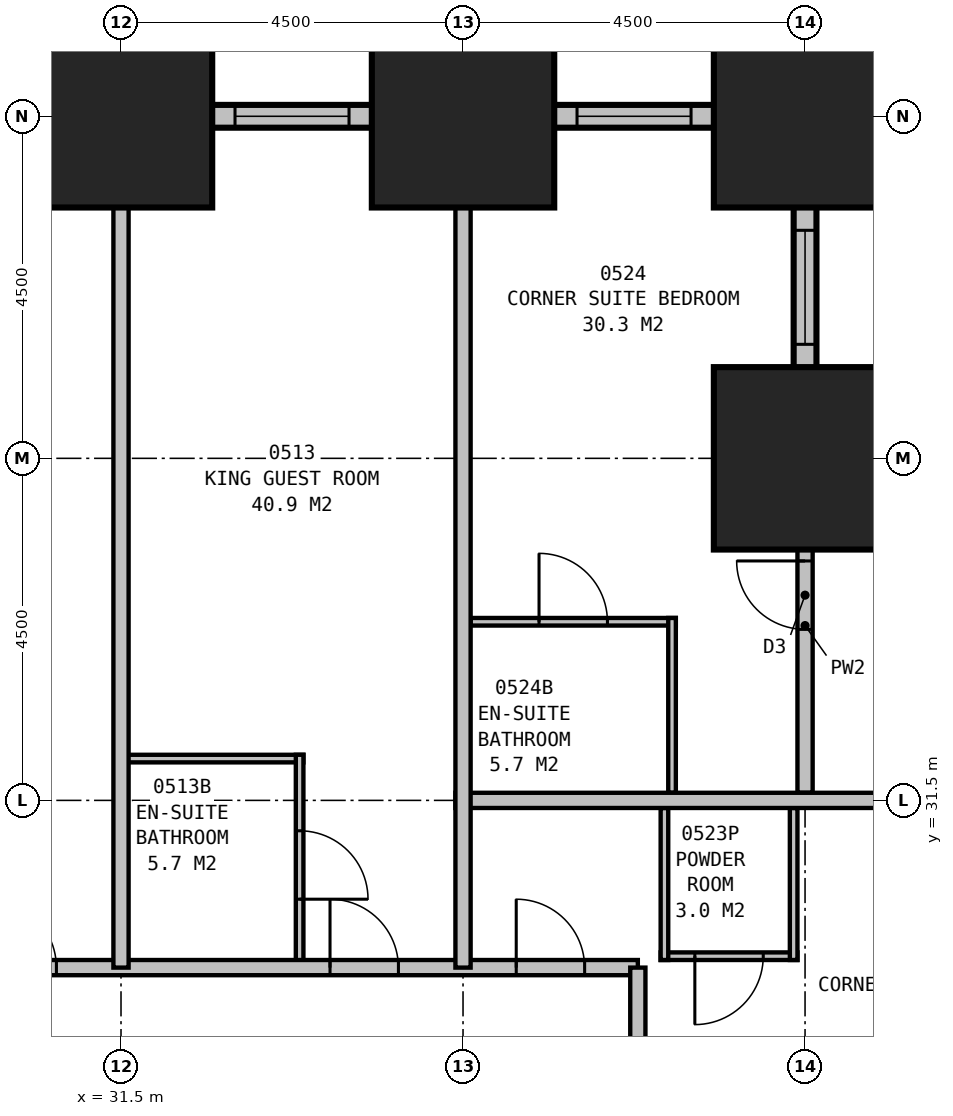
"""IFC4 building model, lengths in metres.
Left out: names, types, materials, properties, quantities, classifications, styles, units other than length and angle.
Written with IfcOpenShell. Run it as: python <this file> out.ifc"""

import sys

from ifc_helpers import new_model, si_unit, direction, frame, frame_2d, origin, origin_2d, place, context, subcontext, project, spatial, rectangle, extrude, element, fill, save


model = new_model("IFC4")
c1 = context("Model", 3, precision=1e-05, world=origin(), true_north=direction((0.0, 1.0)))
c2 = subcontext(c1, "Body", "Model", "MODEL_VIEW")
j1 = project(units=[si_unit("LENGTHUNIT", "METRE"), si_unit("PLANEANGLEUNIT", "RADIAN")], contexts=[c1])
p1 = place(None, origin())
s1 = spatial("IfcSite", under=j1, at=p1, CompositionType="ELEMENT")
p2 = place(p1, origin())
s2 = spatial("IfcBuilding", under=s1, at=p2, CompositionType="ELEMENT")
p3 = place(p2, frame((0.0, 0.0, 29.7)))
s3 = spatial("IfcBuildingStorey", under=s2, at=p3, CompositionType="ELEMENT", Elevation=29.7)
for number, where, z_axis, x_axis in (
    (1, (40.5, 36.0, 0.0), (0.0, 0.0, 1.0), (1.0, 0.0, 0.0)),
    (2, (40.5, 40.5, 0.0), (0.0, 0.0, 1.0), (1.0, 0.0, 0.0)),
    (3, (36.0, 40.5, 0.0), (0.0, 0.0, 1.0), (1.0, 0.0, 0.0)),
    (4, (31.5, 40.5, 0.0), (0.0, 0.0, 1.0), (1.0, 0.0, 0.0)),
):
    element("IfcColumn", number, at=place(p3, frame(where, z_axis=z_axis, x_axis=x_axis)), inside=s3, PredefinedType="COLUMN", context=c2, shape_type="SweptSolid", body=[
        extrude(rectangle(XDim=2.4, YDim=2.4, at=origin_2d()), origin(), (0.0, 0.0, 1.0), 3.5),
    ])
p4 = place(p3, frame((45.65, 36.0, 0.0), z_axis=(0.0, 0.0, 1.0), x_axis=(-1.0, 0.0, 0.0)))
e5 = element("IfcWall", 5, at=p4, inside=s3, PredefinedType="STANDARD", context=c2, shape_type="SweptSolid", body=[
    extrude(rectangle(XDim=5.3, YDim=0.3, at=frame_2d((2.65, 0.0))), origin(), (0.0, 0.0, 1.0), 2.05),
])
p5 = place(p4, frame((1.9, 0.0, 0.5)))
e6 = element("IfcOpeningElement", 6, at=p5, cuts=e5, PredefinedType="OPENING", context=c2, shape_type="SweptSolid", body=[
    extrude(rectangle(XDim=1.5, YDim=1.4, at=frame_2d((0.75, 0.7))), frame((0.0, 0.16, 0.0), z_axis=(0.0, -1.0, 0.0), x_axis=(1.0, 0.0, 0.0)), (0.0, 0.0, 1.0), 0.32),
])
p6 = place(p3, frame((40.5, 35.85, 0.0), z_axis=(0.0, 0.0, 1.0), x_axis=(0.0, 1.0, 0.0)))
e7 = element("IfcWall", 7, at=p6, inside=s3, PredefinedType="STANDARD", context=c2, shape_type="SweptSolid", body=[
    extrude(rectangle(XDim=4.8, YDim=0.3, at=frame_2d((2.4, 0.0))), origin(), (0.0, 0.0, 1.0), 2.05),
])
p7 = place(p6, frame((1.65, 0.0, 0.5)))
e8 = element("IfcOpeningElement", 8, at=p7, cuts=e7, PredefinedType="OPENING", context=c2, shape_type="SweptSolid", body=[
    extrude(rectangle(XDim=1.5, YDim=1.4, at=frame_2d((0.75, 0.7))), frame((0.0, 0.16, 0.0), z_axis=(0.0, -1.0, 0.0), x_axis=(1.0, 0.0, 0.0)), (0.0, 0.0, 1.0), 0.32),
])
p8 = place(p3, frame((40.65, 40.5, 0.0), z_axis=(0.0, 0.0, 1.0), x_axis=(-1.0, 0.0, 0.0)))
e9 = element("IfcWall", 9, at=p8, inside=s3, PredefinedType="STANDARD", context=c2, shape_type="SweptSolid", body=[
    extrude(rectangle(XDim=31.8, YDim=0.3, at=frame_2d((15.9, 0.0))), origin(), (0.0, 0.0, 1.0), 2.05),
])
p9 = place(p8, frame((1.65, 0.0, 0.5)))
e10 = element("IfcOpeningElement", 10, at=p9, cuts=e9, PredefinedType="OPENING", context=c2, shape_type="SweptSolid", body=[
    extrude(rectangle(XDim=1.5, YDim=1.4, at=frame_2d((0.75, 0.7))), frame((0.0, 0.16, 0.0), z_axis=(0.0, -1.0, 0.0), x_axis=(1.0, 0.0, 0.0)), (0.0, 0.0, 1.0), 0.32),
])
p10 = place(p8, frame((6.15, 0.0, 0.5)))
e11 = element("IfcOpeningElement", 11, at=p10, cuts=e9, PredefinedType="OPENING", context=c2, shape_type="SweptSolid", body=[
    extrude(rectangle(XDim=1.5, YDim=1.4, at=frame_2d((0.75, 0.7))), frame((0.0, 0.16, 0.0), z_axis=(0.0, -1.0, 0.0), x_axis=(1.0, 0.0, 0.0)), (0.0, 0.0, 1.0), 0.32),
])
p11 = place(p8, frame((10.65, 0.0, 0.5)))
e12 = element("IfcOpeningElement", 12, at=p11, cuts=e9, PredefinedType="OPENING", context=c2, shape_type="SweptSolid", body=[
    extrude(rectangle(XDim=1.5, YDim=1.4, at=frame_2d((0.75, 0.7))), frame((0.0, 0.16, 0.0), z_axis=(0.0, -1.0, 0.0), x_axis=(1.0, 0.0, 0.0)), (0.0, 0.0, 1.0), 0.32),
])
p12 = place(p8, frame((15.15, 0.0, 0.5)))
e13 = element("IfcOpeningElement", 13, at=p12, cuts=e9, PredefinedType="OPENING", context=c2, shape_type="SweptSolid", body=[
    extrude(rectangle(XDim=1.5, YDim=1.4, at=frame_2d((0.75, 0.7))), frame((0.0, 0.16, 0.0), z_axis=(0.0, -1.0, 0.0), x_axis=(1.0, 0.0, 0.0)), (0.0, 0.0, 1.0), 0.32),
])
p13 = place(p8, frame((19.65, 0.0, 0.5)))
e14 = element("IfcOpeningElement", 14, at=p13, cuts=e9, PredefinedType="OPENING", context=c2, shape_type="SweptSolid", body=[
    extrude(rectangle(XDim=1.5, YDim=1.4, at=frame_2d((0.75, 0.7))), frame((0.0, 0.16, 0.0), z_axis=(0.0, -1.0, 0.0), x_axis=(1.0, 0.0, 0.0)), (0.0, 0.0, 1.0), 0.32),
])
p14 = place(p8, frame((24.15, 0.0, 0.5)))
e15 = element("IfcOpeningElement", 15, at=p14, cuts=e9, PredefinedType="OPENING", context=c2, shape_type="SweptSolid", body=[
    extrude(rectangle(XDim=1.5, YDim=1.4, at=frame_2d((0.75, 0.7))), frame((0.0, 0.16, 0.0), z_axis=(0.0, -1.0, 0.0), x_axis=(1.0, 0.0, 0.0)), (0.0, 0.0, 1.0), 0.32),
])
p15 = place(p8, frame((28.65, 0.0, 0.5)))
e16 = element("IfcOpeningElement", 16, at=p15, cuts=e9, PredefinedType="OPENING", context=c2, shape_type="SweptSolid", body=[
    extrude(rectangle(XDim=1.5, YDim=1.4, at=frame_2d((0.75, 0.7))), frame((0.0, 0.16, 0.0), z_axis=(0.0, -1.0, 0.0), x_axis=(1.0, 0.0, 0.0)), (0.0, 0.0, 1.0), 0.32),
])
p16 = place(p3, frame((11.2, 29.3, 0.0), z_axis=(0.0, 0.0, 1.0), x_axis=(1.0, 0.0, 0.0)))
e17 = element("IfcWall", 17, at=p16, inside=s3, PredefinedType="PARTITIONING", context=c2, shape_type="SweptSolid", body=[
    extrude(rectangle(XDim=27.1, YDim=0.2, at=frame_2d((13.55, 0.0))), origin(), (0.0, 0.0, 1.0), 3.25),
])
p17 = place(p16, frame((5.05, 0.0, 0.0)))
e18 = element("IfcOpeningElement", 18, at=p17, cuts=e17, PredefinedType="OPENING", context=c2, shape_type="SweptSolid", body=[
    extrude(rectangle(XDim=0.9, YDim=2.1, at=frame_2d((0.45, 1.05))), frame((0.0, 0.11, 0.0), z_axis=(0.0, -1.0, 0.0), x_axis=(1.0, 0.0, 0.0)), (0.0, 0.0, 1.0), 0.22),
])
p18 = place(p16, frame((9.55, 0.0, 0.0)))
e19 = element("IfcOpeningElement", 19, at=p18, cuts=e17, PredefinedType="OPENING", context=c2, shape_type="SweptSolid", body=[
    extrude(rectangle(XDim=0.9, YDim=2.1, at=frame_2d((0.45, 1.05))), frame((0.0, 0.11, 0.0), z_axis=(0.0, -1.0, 0.0), x_axis=(1.0, 0.0, 0.0)), (0.0, 0.0, 1.0), 0.22),
])
p19 = place(p16, frame((14.05, 0.0, 0.0)))
e20 = element("IfcOpeningElement", 20, at=p19, cuts=e17, PredefinedType="OPENING", context=c2, shape_type="SweptSolid", body=[
    extrude(rectangle(XDim=0.9, YDim=2.1, at=frame_2d((0.45, 1.05))), frame((0.0, 0.11, 0.0), z_axis=(0.0, -1.0, 0.0), x_axis=(1.0, 0.0, 0.0)), (0.0, 0.0, 1.0), 0.22),
])
p20 = place(p16, frame((18.55, 0.0, 0.0)))
e21 = element("IfcOpeningElement", 21, at=p20, cuts=e17, PredefinedType="OPENING", context=c2, shape_type="SweptSolid", body=[
    extrude(rectangle(XDim=0.9, YDim=2.1, at=frame_2d((0.45, 1.05))), frame((0.0, 0.11, 0.0), z_axis=(0.0, -1.0, 0.0), x_axis=(1.0, 0.0, 0.0)), (0.0, 0.0, 1.0), 0.22),
])
p21 = place(p16, frame((23.05, 0.0, 0.0)))
e22 = element("IfcOpeningElement", 22, at=p21, cuts=e17, PredefinedType="OPENING", context=c2, shape_type="SweptSolid", body=[
    extrude(rectangle(XDim=0.9, YDim=2.1, at=frame_2d((0.45, 1.05))), frame((0.0, 0.11, 0.0), z_axis=(0.0, -1.0, 0.0), x_axis=(1.0, 0.0, 0.0)), (0.0, 0.0, 1.0), 0.22),
])
p22 = place(p16, frame((25.5, 0.0, 0.0)))
e23 = element("IfcOpeningElement", 23, at=p22, cuts=e17, PredefinedType="OPENING", context=c2, shape_type="SweptSolid", body=[
    extrude(rectangle(XDim=0.9, YDim=2.1, at=frame_2d((0.45, 1.05))), frame((0.0, 0.11, 0.0), z_axis=(0.0, -1.0, 0.0), x_axis=(1.0, 0.0, 0.0)), (0.0, 0.0, 1.0), 0.22),
])
p23 = place(p16, frame((0.7, 0.0, 0.0)))
e24 = element("IfcOpeningElement", 24, at=p23, cuts=e17, PredefinedType="OPENING", context=c2, shape_type="SweptSolid", body=[
    extrude(rectangle(XDim=0.9, YDim=2.1, at=frame_2d((0.45, 1.05))), frame((0.0, 0.11, 0.0), z_axis=(0.0, -1.0, 0.0), x_axis=(1.0, 0.0, 0.0)), (0.0, 0.0, 1.0), 0.22),
])
p24 = place(p3, frame((38.3, 11.2, 0.0), z_axis=(0.0, 0.0, 1.0), x_axis=(0.0, 1.0, 0.0)))
e25 = element("IfcWall", 25, at=p24, inside=s3, PredefinedType="PARTITIONING", context=c2, shape_type="SweptSolid", body=[
    extrude(rectangle(XDim=18.1, YDim=0.2, at=frame_2d((9.05, 0.0))), origin(), (0.0, 0.0, 1.0), 3.25),
])
p25 = place(p24, frame((5.95, 0.0, 0.0), z_axis=(0.0, 0.0, 1.0), x_axis=(-1.0, 0.0, 0.0)))
e26 = element("IfcOpeningElement", 26, at=p25, cuts=e25, PredefinedType="OPENING", context=c2, shape_type="SweptSolid", body=[
    extrude(rectangle(XDim=0.9, YDim=2.1, at=frame_2d((0.45, 1.05))), frame((0.0, 0.11, 0.0), z_axis=(0.0, -1.0, 0.0), x_axis=(1.0, 0.0, 0.0)), (0.0, 0.0, 1.0), 0.22),
])
p26 = place(p24, frame((10.45, 0.0, 0.0), z_axis=(0.0, 0.0, 1.0), x_axis=(-1.0, 0.0, 0.0)))
e27 = element("IfcOpeningElement", 27, at=p26, cuts=e25, PredefinedType="OPENING", context=c2, shape_type="SweptSolid", body=[
    extrude(rectangle(XDim=0.9, YDim=2.1, at=frame_2d((0.45, 1.05))), frame((0.0, 0.11, 0.0), z_axis=(0.0, -1.0, 0.0), x_axis=(1.0, 0.0, 0.0)), (0.0, 0.0, 1.0), 0.22),
])
p27 = place(p24, frame((13.0, 0.0, 0.0), z_axis=(0.0, 0.0, 1.0), x_axis=(-1.0, 0.0, 0.0)))
e28 = element("IfcOpeningElement", 28, at=p27, cuts=e25, PredefinedType="OPENING", context=c2, shape_type="SweptSolid", body=[
    extrude(rectangle(XDim=1.0, YDim=2.1, at=frame_2d((0.5, 1.05))), frame((0.0, 0.11, 0.0), z_axis=(0.0, -1.0, 0.0), x_axis=(1.0, 0.0, 0.0)), (0.0, 0.0, 1.0), 0.22),
])
p28 = place(p3, frame((31.5, 29.3, 0.0), z_axis=(0.0, 0.0, 1.0), x_axis=(0.0, 1.0, 0.0)))
e29 = element("IfcWall", 29, at=p28, inside=s3, PredefinedType="PARTITIONING", context=c2, shape_type="SweptSolid", body=[
    extrude(rectangle(XDim=11.2, YDim=0.2, at=frame_2d((5.6, 0.0))), origin(), (0.0, 0.0, 1.0), 2.25),
])
p29 = place(p3, frame((31.5, 32.05, 0.0), z_axis=(0.0, 0.0, 1.0), x_axis=(1.0, 0.0, 0.0)))
e30 = element("IfcWall", 30, at=p29, inside=s3, PredefinedType="PLUMBINGWALL", context=c2, shape_type="SweptSolid", body=[
    extrude(rectangle(XDim=2.4, YDim=0.1, at=frame_2d((1.2, 0.0))), origin(), (0.0, 0.0, 1.0), 3.25),
])
p30 = place(p3, frame((33.85, 29.3, 0.0), z_axis=(0.0, 0.0, 1.0), x_axis=(0.0, 1.0, 0.0)))
e31 = element("IfcWall", 31, at=p30, inside=s3, PredefinedType="PLUMBINGWALL", context=c2, shape_type="SweptSolid", body=[
    extrude(rectangle(XDim=2.8, YDim=0.1, at=frame_2d((1.4, 0.0))), origin(), (0.0, 0.0, 1.0), 3.25),
])
p31 = place(p30, frame((1.8, 0.0, 0.0), z_axis=(0.0, 0.0, 1.0), x_axis=(-1.0, 0.0, 0.0)))
e32 = element("IfcOpeningElement", 32, at=p31, cuts=e31, PredefinedType="OPENING", context=c2, shape_type="SweptSolid", body=[
    extrude(rectangle(XDim=0.9, YDim=2.1, at=frame_2d((0.45, 1.05))), frame((0.0, 0.06, 0.0), z_axis=(0.0, -1.0, 0.0), x_axis=(1.0, 0.0, 0.0)), (0.0, 0.0, 1.0), 0.12),
])
p32 = place(p3, frame((36.0, 29.3, 0.0), z_axis=(0.0, 0.0, 1.0), x_axis=(0.0, 1.0, 0.0)))
e33 = element("IfcWall", 33, at=p32, inside=s3, PredefinedType="PARTITIONING", context=c2, shape_type="SweptSolid", body=[
    extrude(rectangle(XDim=11.2, YDim=0.2, at=frame_2d((5.6, 0.0))), origin(), (0.0, 0.0, 1.0), 2.25),
])
p33 = place(p3, frame((35.9, 31.5, 0.0), z_axis=(0.0, 0.0, 1.0), x_axis=(1.0, 0.0, 0.0)))
e34 = element("IfcWall", 34, at=p33, inside=s3, PredefinedType="PARTITIONING", context=c2, shape_type="SweptSolid", body=[
    extrude(rectangle(XDim=10.099, YDim=0.2, at=frame_2d((5.05, 0.0))), origin(), (0.0, 0.0, 1.0), 3.25),
])
p34 = place(p33, frame((7.849, 0.0, 0.0)))
e35 = element("IfcOpeningElement", 35, at=p34, cuts=e34, PredefinedType="OPENING", context=c2, shape_type="SweptSolid", body=[
    extrude(rectangle(XDim=0.9, YDim=2.1, at=frame_2d((0.45, 1.05))), frame((0.0, 0.11, 0.0), z_axis=(0.0, -1.0, 0.0), x_axis=(1.0, 0.0, 0.0)), (0.0, 0.0, 1.0), 0.22),
])
p35 = place(p3, frame((40.35, 31.4, 0.0), z_axis=(0.0, 0.0, 1.0), x_axis=(0.0, -1.0, 0.0)))
e36 = element("IfcWall", 36, at=p35, inside=s3, PredefinedType="PLUMBINGWALL", context=c2, shape_type="SweptSolid", body=[
    extrude(rectangle(XDim=2.0, YDim=0.1, at=frame_2d((1.0, 0.0))), origin(), (0.0, 0.0, 1.0), 2.25),
])
p36 = place(p3, frame((38.65, 31.4, 0.0), z_axis=(0.0, 0.0, 1.0), x_axis=(0.0, -1.0, 0.0)))
e37 = element("IfcWall", 37, at=p36, inside=s3, PredefinedType="PLUMBINGWALL", context=c2, shape_type="SweptSolid", body=[
    extrude(rectangle(XDim=2.0, YDim=0.1, at=frame_2d((1.0, 0.0))), origin(), (0.0, 0.0, 1.0), 3.25),
])
p37 = place(p3, frame((38.6, 29.45, 0.0), z_axis=(0.0, 0.0, 1.0), x_axis=(1.0, 0.0, 0.0)))
e38 = element("IfcWall", 38, at=p37, inside=s3, PredefinedType="PLUMBINGWALL", context=c2, shape_type="SweptSolid", body=[
    extrude(rectangle(XDim=1.8, YDim=0.1, at=frame_2d((0.9, 0.0))), origin(), (0.0, 0.0, 1.0), 3.25),
])
p38 = place(p37, frame((1.35, 0.0, 0.0), z_axis=(0.0, 0.0, 1.0), x_axis=(-1.0, 0.0, 0.0)))
e39 = element("IfcOpeningElement", 39, at=p38, cuts=e38, PredefinedType="OPENING", context=c2, shape_type="SweptSolid", body=[
    extrude(rectangle(XDim=0.9, YDim=2.1, at=frame_2d((0.45, 1.05))), frame((0.0, 0.06, 0.0), z_axis=(0.0, -1.0, 0.0), x_axis=(1.0, 0.0, 0.0)), (0.0, 0.0, 1.0), 0.12),
])
p39 = place(p3, frame((40.5, 31.6, 0.0), z_axis=(0.0, 0.0, 1.0), x_axis=(0.0, 1.0, 0.0)))
e40 = element("IfcWall", 40, at=p39, inside=s3, PredefinedType="PARTITIONING", context=c2, shape_type="SweptSolid", body=[
    extrude(rectangle(XDim=4.4, YDim=0.2, at=frame_2d((2.2, 0.0))), origin(), (0.0, 0.0, 1.0), 2.25),
])
p40 = place(p39, frame((2.15, 0.0, 0.0)))
e41 = element("IfcOpeningElement", 41, at=p40, cuts=e40, PredefinedType="OPENING", context=c2, shape_type="SweptSolid", body=[
    extrude(rectangle(XDim=0.9, YDim=2.1, at=frame_2d((0.45, 1.05))), frame((0.0, 0.11, 0.0), z_axis=(0.0, -1.0, 0.0), x_axis=(1.0, 0.0, 0.0)), (0.0, 0.0, 1.0), 0.22),
])
p41 = place(p3, frame((38.75, 31.6, 0.0), z_axis=(0.0, 0.0, 1.0), x_axis=(0.0, 1.0, 0.0)))
e42 = element("IfcWall", 42, at=p41, inside=s3, PredefinedType="PLUMBINGWALL", context=c2, shape_type="SweptSolid", body=[
    extrude(rectangle(XDim=2.3, YDim=0.1, at=frame_2d((1.15, 0.0))), origin(), (0.0, 0.0, 1.0), 3.25),
])
p42 = place(p3, frame((36.1, 33.85, 0.0), z_axis=(0.0, 0.0, 1.0), x_axis=(1.0, 0.0, 0.0)))
e43 = element("IfcWall", 43, at=p42, inside=s3, PredefinedType="PLUMBINGWALL", context=c2, shape_type="SweptSolid", body=[
    extrude(rectangle(XDim=2.7, YDim=0.1, at=frame_2d((1.35, 0.0))), origin(), (0.0, 0.0, 1.0), 3.25),
])
p43 = place(p42, frame((0.9, 0.0, 0.0)))
e44 = element("IfcOpeningElement", 44, at=p43, cuts=e43, PredefinedType="OPENING", context=c2, shape_type="SweptSolid", body=[
    extrude(rectangle(XDim=0.9, YDim=2.1, at=frame_2d((0.45, 1.05))), frame((0.0, 0.06, 0.0), z_axis=(0.0, -1.0, 0.0), x_axis=(1.0, 0.0, 0.0)), (0.0, 0.0, 1.0), 0.12),
])
p44 = place(p7, origin())
e45 = element("IfcWindow", 45, at=p44, inside=s3, PartitioningType="SINGLE_PANEL", PredefinedType="WINDOW", context=c2, shape_type="SweptSolid", body=[
    extrude(rectangle(XDim=1.5, YDim=1.4, at=frame_2d((0.75, 0.7))), frame((0.0, 0.03, 0.0), z_axis=(0.0, -1.0, 0.0), x_axis=(1.0, 0.0, 0.0)), (0.0, 0.0, 1.0), 0.06),
])
fill(e8, e45)
p45 = place(p9, origin())
e46 = element("IfcWindow", 46, at=p45, inside=s3, PartitioningType="SINGLE_PANEL", PredefinedType="WINDOW", context=c2, shape_type="SweptSolid", body=[
    extrude(rectangle(XDim=1.5, YDim=1.4, at=frame_2d((0.75, 0.7))), frame((0.0, 0.03, 0.0), z_axis=(0.0, -1.0, 0.0), x_axis=(1.0, 0.0, 0.0)), (0.0, 0.0, 1.0), 0.06),
])
fill(e10, e46)
p46 = place(p10, origin())
e47 = element("IfcWindow", 47, at=p46, inside=s3, PartitioningType="SINGLE_PANEL", PredefinedType="WINDOW", context=c2, shape_type="SweptSolid", body=[
    extrude(rectangle(XDim=1.5, YDim=1.4, at=frame_2d((0.75, 0.7))), frame((0.0, 0.03, 0.0), z_axis=(0.0, -1.0, 0.0), x_axis=(1.0, 0.0, 0.0)), (0.0, 0.0, 1.0), 0.06),
])
fill(e11, e47)
p47 = place(p20, origin())
e48 = element("IfcDoor", 48, at=p47, inside=s3, OperationType="SINGLE_SWING_LEFT", PredefinedType="DOOR", context=c2, shape_type="SweptSolid", body=[
    extrude(rectangle(XDim=0.9, YDim=2.1, at=frame_2d((0.45, 1.05))), frame((0.0, 0.025, 0.0), z_axis=(0.0, -1.0, 0.0), x_axis=(1.0, 0.0, 0.0)), (0.0, 0.0, 1.0), 0.05),
])
fill(e21, e48)
p48 = place(p21, origin())
e49 = element("IfcDoor", 49, at=p48, inside=s3, OperationType="SINGLE_SWING_LEFT", PredefinedType="DOOR", context=c2, shape_type="SweptSolid", body=[
    extrude(rectangle(XDim=0.9, YDim=2.1, at=frame_2d((0.45, 1.05))), frame((0.0, 0.025, 0.0), z_axis=(0.0, -1.0, 0.0), x_axis=(1.0, 0.0, 0.0)), (0.0, 0.0, 1.0), 0.05),
])
fill(e22, e49)
p49 = place(p22, origin())
e50 = element("IfcDoor", 50, at=p49, inside=s3, OperationType="SINGLE_SWING_LEFT", PredefinedType="DOOR", context=c2, shape_type="SweptSolid", body=[
    extrude(rectangle(XDim=0.9, YDim=2.1, at=frame_2d((0.45, 1.05))), frame((0.0, 0.025, 0.0), z_axis=(0.0, -1.0, 0.0), x_axis=(1.0, 0.0, 0.0)), (0.0, 0.0, 1.0), 0.05),
])
fill(e23, e50)
p50 = place(p31, origin())
e51 = element("IfcDoor", 51, at=p50, inside=s3, OperationType="SINGLE_SWING_RIGHT", PredefinedType="DOOR", context=c2, shape_type="SweptSolid", body=[
    extrude(rectangle(XDim=0.9, YDim=2.1, at=frame_2d((0.45, 1.05))), frame((0.0, 0.025, 0.0), z_axis=(0.0, -1.0, 0.0), x_axis=(1.0, 0.0, 0.0)), (0.0, 0.0, 1.0), 0.05),
])
fill(e32, e51)
p51 = place(p38, origin())
e52 = element("IfcDoor", 52, at=p51, inside=s3, OperationType="SINGLE_SWING_RIGHT", PredefinedType="DOOR", context=c2, shape_type="SweptSolid", body=[
    extrude(rectangle(XDim=0.9, YDim=2.1, at=frame_2d((0.45, 1.05))), frame((0.0, 0.025, 0.0), z_axis=(0.0, -1.0, 0.0), x_axis=(1.0, 0.0, 0.0)), (0.0, 0.0, 1.0), 0.05),
])
fill(e39, e52)
p52 = place(p40, origin())
e53 = element("IfcDoor", 53, at=p52, inside=s3, OperationType="SINGLE_SWING_RIGHT", PredefinedType="DOOR", context=c2, shape_type="SweptSolid", body=[
    extrude(rectangle(XDim=0.9, YDim=2.1, at=frame_2d((0.45, 1.05))), frame((0.0, 0.025, 0.0), z_axis=(0.0, -1.0, 0.0), x_axis=(1.0, 0.0, 0.0)), (0.0, 0.0, 1.0), 0.05),
])
fill(e41, e53)
p53 = place(p43, origin())
e54 = element("IfcDoor", 54, at=p53, inside=s3, OperationType="SINGLE_SWING_LEFT", PredefinedType="DOOR", context=c2, shape_type="SweptSolid", body=[
    extrude(rectangle(XDim=0.9, YDim=2.1, at=frame_2d((0.45, 1.05))), frame((0.0, 0.025, 0.0), z_axis=(0.0, -1.0, 0.0), x_axis=(1.0, 0.0, 0.0)), (0.0, 0.0, 1.0), 0.05),
])
fill(e44, e54)
save(model, sys.argv[1])
